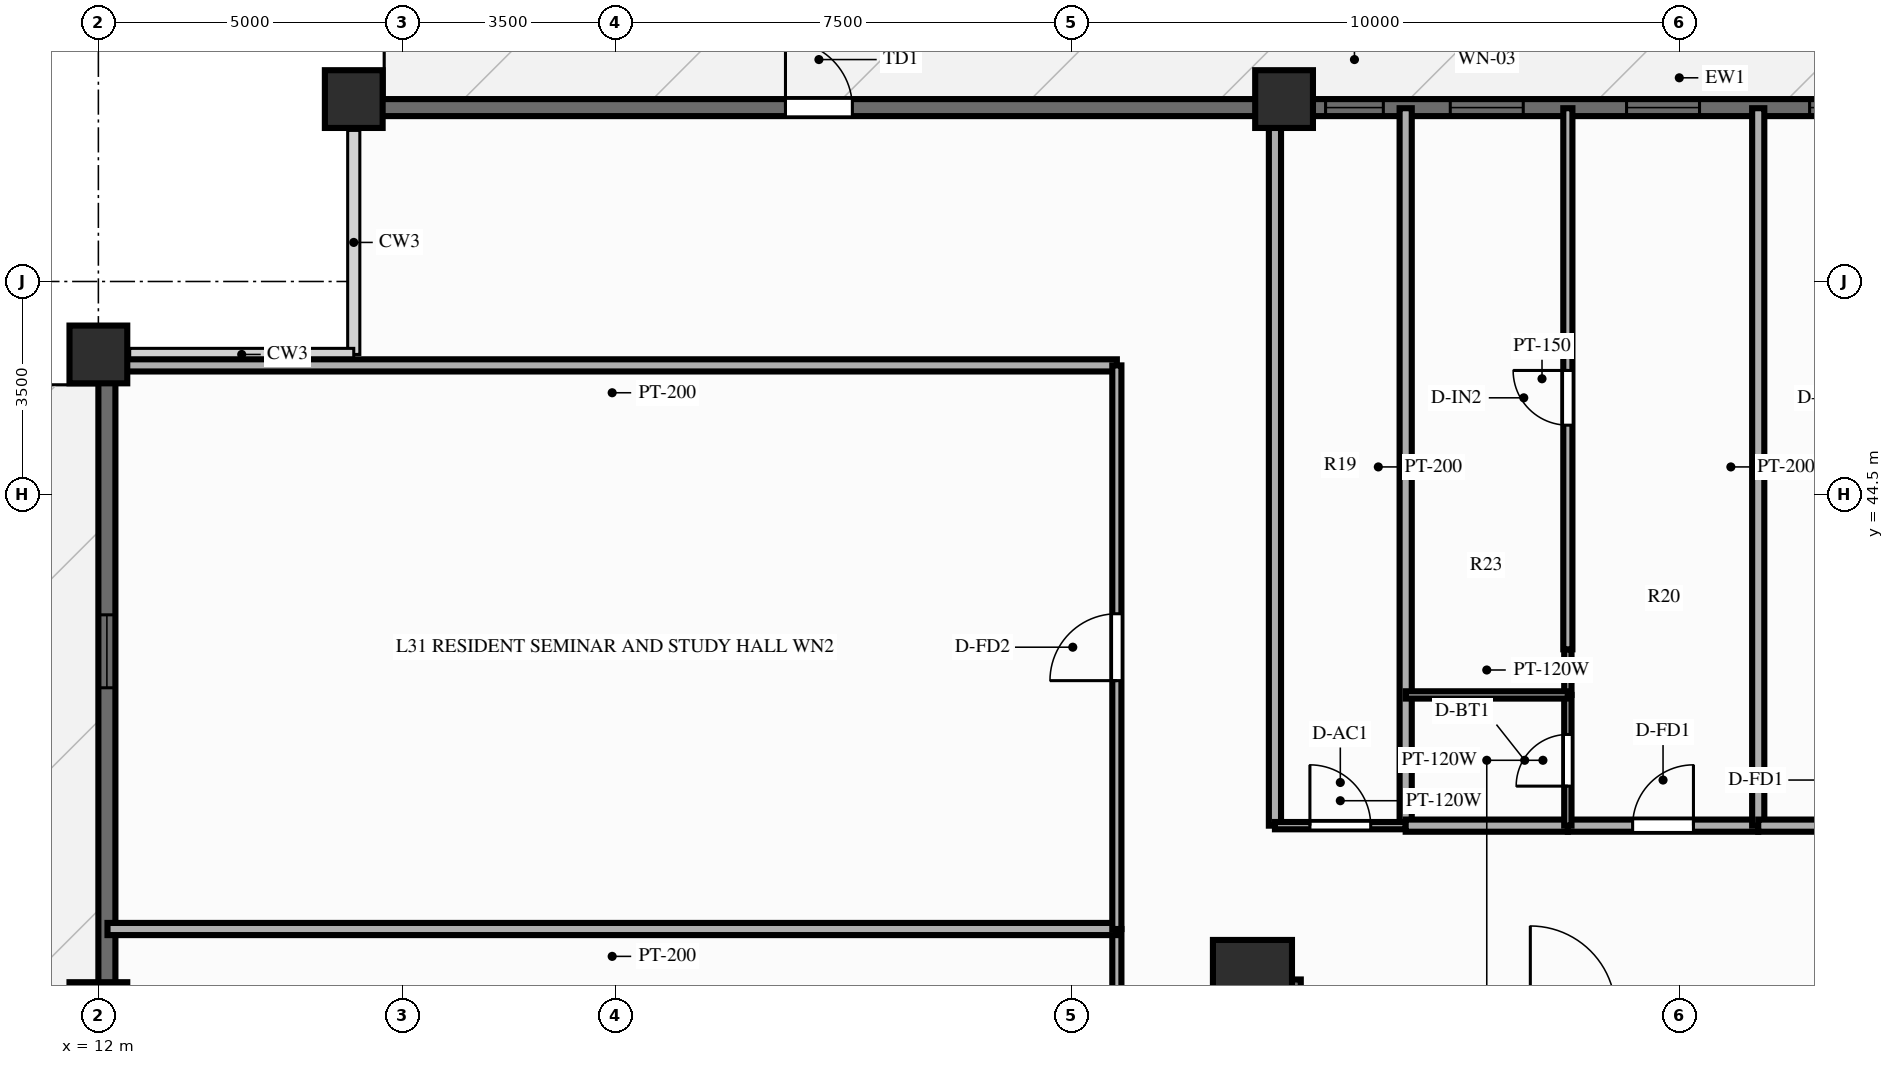
"""IFC4 building model, lengths in metres.
Left out: names, types, materials, properties, quantities, classifications, styles, units other than length and angle.
Written with IfcOpenShell. Run it as: python <this file> out.ifc"""

import sys

from ifc_helpers import new_model, si_unit, direction, frame, frame_2d, origin, origin_2d, place, context, subcontext, project, spatial, rectangle, extrude, source, transform, mapped, element, fill, save


model = new_model("IFC4")
c1 = context("Model", 3, precision=1e-05, world=origin(), true_north=direction((0.0, 1.0)))
c2 = subcontext(c1, "Body", "Model", "MODEL_VIEW")
j1 = project(units=[si_unit("LENGTHUNIT", "METRE"), si_unit("PLANEANGLEUNIT", "RADIAN")], contexts=[c1])
p1 = place(None, origin())
s1 = spatial("IfcSite", under=j1, at=p1, CompositionType="ELEMENT")
p2 = place(p1, origin())
s2 = spatial("IfcBuilding", under=s1, at=p2, CompositionType="ELEMENT")
p3 = place(p2, frame((0.0, 0.0, 98.85)))
s3 = spatial("IfcBuildingStorey", under=s2, at=p3, CompositionType="ELEMENT", Elevation=98.85)
p4 = place(p3, frame((31.5, 17.48, 0.0), z_axis=(0.0, 0.0, 1.0), x_axis=(0.0, 1.0, 0.0)))
e1 = element("IfcWall", 1, at=p4, inside=s3, PredefinedType="SHEAR", context=c2, shape_type="SweptSolid", body=[
    extrude(rectangle(XDim=19.04, YDim=0.55, at=frame_2d((9.52, 0.0))), origin(), (0.0, 0.0, 1.0), 3.0),
])
p5 = place(p4, frame((6.32, 0.0, 0.0)))
e2 = element("IfcOpeningElement", 2, at=p5, cuts=e1, PredefinedType="OPENING", context=c2, shape_type="SweptSolid", body=[
    extrude(rectangle(XDim=1.1, YDim=2.15, at=frame_2d((0.55, 1.075))), frame((0.0, 0.287, 0.0), z_axis=(0.0, -1.0, 0.0), x_axis=(1.0, 0.0, 0.0)), (0.0, 0.0, 1.0), 0.574),
])
m1 = source(origin(), c2, "Body", "SweptSolid", [
    extrude(rectangle(XDim=1.3, YDim=1.3, at=origin_2d()), origin(), (0.0, 0.0, 1.0), 3.0),
])
p6 = place(p3, frame((30.98, 36.52, 0.0), z_axis=(0.0, 0.0, 1.0), x_axis=(1.0, 0.0, 0.0)))
e3 = element("IfcColumn", 3, at=p6, inside=s3, PredefinedType="COLUMN", context=c2, shape_type="MappedRepresentation", body=[
    mapped(m1, transform((0.0, 0.0, 0.0), scale=1.0)),
])
m2 = source(origin(), c2, "Body", "SweptSolid", [
    extrude(rectangle(XDim=0.95, YDim=0.95, at=origin_2d()), origin(), (0.0, 0.0, 1.0), 3.0),
])
for number, where, z_axis, x_axis in (
    (4, (31.5, 51.0, 0.0), (0.0, 0.0, 1.0), (1.0, 0.0, 0.0)),
    (5, (16.2, 51.0, 0.0), (0.0, 0.0, 1.0), (1.0, 0.0, 0.0)),
    (6, (12.0, 46.8, 0.0), (0.0, 0.0, 1.0), (1.0, 0.0, 0.0)),
    (7, (12.0, 36.0, 0.0), (0.0, 0.0, 1.0), (1.0, 0.0, 0.0)),
):
    element("IfcColumn", number, at=place(p3, frame(where, z_axis=z_axis, x_axis=x_axis)), inside=s3, PredefinedType="COLUMN", context=c2, shape_type="MappedRepresentation", body=[
        mapped(m2, transform((0.0, 0.0, 0.0), scale=1.0)),
    ])
p7 = place(p3, frame((16.2, 50.86, 0.0), z_axis=(0.0, 0.0, 1.0), x_axis=(1.0, 0.0, 0.0)))
e8 = element("IfcWall", 8, at=p7, inside=s3, PredefinedType="SOLIDWALL", context=c2, shape_type="SweptSolid", body=[
    extrude(rectangle(XDim=43.6, YDim=0.28, at=frame_2d((21.8, 0.0))), origin(), (0.0, 0.0, 1.0), 2.28),
])
p8 = place(p7, frame((7.1, 0.0, 0.0)))
e9 = element("IfcOpeningElement", 9, at=p8, cuts=e8, PredefinedType="OPENING", context=c2, shape_type="SweptSolid", body=[
    extrude(rectangle(XDim=1.1, YDim=2.15, at=frame_2d((0.55, 1.075))), frame((0.0, 0.152, 0.0), z_axis=(0.0, -1.0, 0.0), x_axis=(1.0, 0.0, 0.0)), (0.0, 0.0, 1.0), 0.304),
])
p9 = place(p7, frame((15.982, 0.0, 0.25)))
e10 = element("IfcOpeningElement", 10, at=p9, cuts=e8, PredefinedType="OPENING", context=c2, shape_type="SweptSolid", body=[
    extrude(rectangle(XDim=0.95, YDim=1.5, at=frame_2d((0.475, 0.75))), frame((0.0, 0.152, 0.0), z_axis=(0.0, -1.0, 0.0), x_axis=(1.0, 0.0, 0.0)), (0.0, 0.0, 1.0), 0.304),
])
p10 = place(p7, frame((18.033, 0.0, 0.25)))
e11 = element("IfcOpeningElement", 11, at=p10, cuts=e8, PredefinedType="OPENING", context=c2, shape_type="SweptSolid", body=[
    extrude(rectangle(XDim=1.2, YDim=1.5, at=frame_2d((0.6, 0.75))), frame((0.0, 0.152, 0.0), z_axis=(0.0, -1.0, 0.0), x_axis=(1.0, 0.0, 0.0)), (0.0, 0.0, 1.0), 0.304),
])
p11 = place(p7, frame((20.933, 0.0, 0.25)))
e12 = element("IfcOpeningElement", 12, at=p11, cuts=e8, PredefinedType="OPENING", context=c2, shape_type="SweptSolid", body=[
    extrude(rectangle(XDim=1.2, YDim=1.5, at=frame_2d((0.6, 0.75))), frame((0.0, 0.152, 0.0), z_axis=(0.0, -1.0, 0.0), x_axis=(1.0, 0.0, 0.0)), (0.0, 0.0, 1.0), 0.304),
])
p12 = place(p7, frame((23.943, 0.0, 0.25)))
e13 = element("IfcOpeningElement", 13, at=p12, cuts=e8, PredefinedType="OPENING", context=c2, shape_type="SweptSolid", body=[
    extrude(rectangle(XDim=1.2, YDim=1.5, at=frame_2d((0.6, 0.75))), frame((0.0, 0.152, 0.0), z_axis=(0.0, -1.0, 0.0), x_axis=(1.0, 0.0, 0.0)), (0.0, 0.0, 1.0), 0.304),
])
p13 = place(p7, frame((26.386, 0.0, 0.25)))
e14 = element("IfcOpeningElement", 14, at=p13, cuts=e8, PredefinedType="OPENING", context=c2, shape_type="SweptSolid", body=[
    extrude(rectangle(XDim=1.2, YDim=1.5, at=frame_2d((0.6, 0.75))), frame((0.0, 0.152, 0.0), z_axis=(0.0, -1.0, 0.0), x_axis=(1.0, 0.0, 0.0)), (0.0, 0.0, 1.0), 0.304),
])
p14 = place(p7, frame((35.35, 0.0, 0.25)))
e15 = element("IfcOpeningElement", 15, at=p14, cuts=e8, PredefinedType="OPENING", context=c2, shape_type="SweptSolid", body=[
    extrude(rectangle(XDim=1.2, YDim=1.5, at=frame_2d((0.6, 0.75))), frame((0.0, 0.152, 0.0), z_axis=(0.0, -1.0, 0.0), x_axis=(1.0, 0.0, 0.0)), (0.0, 0.0, 1.0), 0.304),
])
p15 = place(p3, frame((12.14, 7.2, 0.0), z_axis=(0.0, 0.0, 1.0), x_axis=(0.0, 1.0, 0.0)))
e16 = element("IfcWall", 16, at=p15, inside=s3, PredefinedType="SOLIDWALL", context=c2, shape_type="SweptSolid", body=[
    extrude(rectangle(XDim=39.6, YDim=0.28, at=frame_2d((19.8, 0.0))), origin(), (0.0, 0.0, 1.0), 2.28),
])
p16 = place(p15, frame((4.083, 0.0, 0.0)))
e17 = element("IfcOpeningElement", 17, at=p16, cuts=e16, PredefinedType="OPENING", context=c2, shape_type="SweptSolid", body=[
    extrude(rectangle(XDim=1.6, YDim=2.15, at=frame_2d((0.8, 1.075))), frame((0.0, 0.152, 0.0), z_axis=(0.0, -1.0, 0.0), x_axis=(1.0, 0.0, 0.0)), (0.0, 0.0, 1.0), 0.304),
])
p17 = place(p15, frame((14.317, 0.0, 0.25)))
e18 = element("IfcOpeningElement", 18, at=p17, cuts=e16, PredefinedType="OPENING", context=c2, shape_type="SweptSolid", body=[
    extrude(rectangle(XDim=1.2, YDim=1.5, at=frame_2d((0.6, 0.75))), frame((0.0, 0.152, 0.0), z_axis=(0.0, -1.0, 0.0), x_axis=(1.0, 0.0, 0.0)), (0.0, 0.0, 1.0), 0.304),
])
p18 = place(p15, frame((19.2, 0.0, 0.25)))
e19 = element("IfcOpeningElement", 19, at=p18, cuts=e16, PredefinedType="OPENING", context=c2, shape_type="SweptSolid", body=[
    extrude(rectangle(XDim=1.2, YDim=1.5, at=frame_2d((0.6, 0.75))), frame((0.0, 0.152, 0.0), z_axis=(0.0, -1.0, 0.0), x_axis=(1.0, 0.0, 0.0)), (0.0, 0.0, 1.0), 0.304),
])
p19 = place(p15, frame((24.083, 0.0, 0.25)))
e20 = element("IfcOpeningElement", 20, at=p19, cuts=e16, PredefinedType="OPENING", context=c2, shape_type="SweptSolid", body=[
    extrude(rectangle(XDim=1.2, YDim=1.5, at=frame_2d((0.6, 0.75))), frame((0.0, 0.152, 0.0), z_axis=(0.0, -1.0, 0.0), x_axis=(1.0, 0.0, 0.0)), (0.0, 0.0, 1.0), 0.304),
])
p20 = place(p15, frame((34.117, 0.0, 0.25)))
e21 = element("IfcOpeningElement", 21, at=p20, cuts=e16, PredefinedType="OPENING", context=c2, shape_type="SweptSolid", body=[
    extrude(rectangle(XDim=1.2, YDim=1.5, at=frame_2d((0.6, 0.75))), frame((0.0, 0.152, 0.0), z_axis=(0.0, -1.0, 0.0), x_axis=(1.0, 0.0, 0.0)), (0.0, 0.0, 1.0), 0.304),
])
p21 = place(p3, frame((31.35, 39.05, 0.0), z_axis=(0.0, 0.0, 1.0), x_axis=(0.0, 1.0, 0.0)))
e22 = element("IfcWall", 22, at=p21, inside=s3, PredefinedType="PARTITIONING", context=c2, shape_type="SweptSolid", body=[
    extrude(rectangle(XDim=11.8, YDim=0.2, at=frame_2d((5.9, 0.0))), origin(), (0.0, 0.0, 1.0), 2.34),
])
p22 = place(p3, frame((33.5, 39.05, 0.0), z_axis=(0.0, 0.0, 1.0), x_axis=(0.0, 1.0, 0.0)))
e23 = element("IfcWall", 23, at=p22, inside=s3, PredefinedType="PARTITIONING", context=c2, shape_type="SweptSolid", body=[
    extrude(rectangle(XDim=11.8, YDim=0.2, at=frame_2d((5.9, 0.0))), origin(), (0.0, 0.0, 1.0), 2.79),
])
p23 = place(p3, frame((31.35, 39.05, 0.0), z_axis=(0.0, 0.0, 1.0), x_axis=(1.0, 0.0, 0.0)))
e24 = element("IfcWall", 24, at=p23, inside=s3, PredefinedType="PARTITIONING", context=c2, shape_type="SweptSolid", body=[
    extrude(rectangle(XDim=2.15, YDim=0.12, at=frame_2d((1.075, 0.0))), origin(), (0.0, 0.0, 1.0), 2.79),
])
p24 = place(p23, frame((0.575, 0.0, 0.0)))
e25 = element("IfcOpeningElement", 25, at=p24, cuts=e24, PredefinedType="OPENING", context=c2, shape_type="SweptSolid", body=[
    extrude(rectangle(XDim=1.0, YDim=2.1, at=frame_2d((0.5, 1.05))), frame((0.0, 0.072, 0.0), z_axis=(0.0, -1.0, 0.0), x_axis=(1.0, 0.0, 0.0)), (0.0, 0.0, 1.0), 0.144),
])
p25 = place(p3, frame((33.5, 39.05, 0.0), z_axis=(0.0, 0.0, 1.0), x_axis=(1.0, 0.0, 0.0)))
e26 = element("IfcWall", 26, at=p25, inside=s3, PredefinedType="PARTITIONING", context=c2, shape_type="SweptSolid", body=[
    extrude(rectangle(XDim=2.667, YDim=0.2, at=frame_2d((1.333, 0.0))), origin(), (0.0, 0.0, 1.0), 2.79),
])
p26 = place(p3, frame((36.167, 39.05, 0.0), z_axis=(0.0, 0.0, 1.0), x_axis=(1.0, 0.0, 0.0)))
e27 = element("IfcWall", 27, at=p26, inside=s3, PredefinedType="PARTITIONING", context=c2, shape_type="SweptSolid", body=[
    extrude(rectangle(XDim=3.131, YDim=0.2, at=frame_2d((1.565, 0.0))), origin(), (0.0, 0.0, 1.0), 2.79),
])
p27 = place(p26, frame((1.065, 0.0, 0.0)))
e28 = element("IfcOpeningElement", 28, at=p27, cuts=e27, PredefinedType="OPENING", context=c2, shape_type="SweptSolid", body=[
    extrude(rectangle(XDim=1.0, YDim=2.15, at=frame_2d((0.5, 1.075))), frame((0.0, 0.112, 0.0), z_axis=(0.0, -1.0, 0.0), x_axis=(1.0, 0.0, 0.0)), (0.0, 0.0, 1.0), 0.224),
])
p28 = place(p3, frame((36.167, 39.05, 0.0), z_axis=(0.0, 0.0, 1.0), x_axis=(0.0, 1.0, 0.0)))
e29 = element("IfcWall", 29, at=p28, inside=s3, PredefinedType="PARTITIONING", context=c2, shape_type="SweptSolid", body=[
    extrude(rectangle(XDim=2.15, YDim=0.12, at=frame_2d((1.075, 0.0))), origin(), (0.0, 0.0, 1.0), 2.79),
])
p29 = place(p28, frame((0.65, 0.0, 0.0)))
e30 = element("IfcOpeningElement", 30, at=p29, cuts=e29, PredefinedType="OPENING", context=c2, shape_type="SweptSolid", body=[
    extrude(rectangle(XDim=0.85, YDim=2.05, at=frame_2d((0.425, 1.025))), frame((0.0, 0.072, 0.0), z_axis=(0.0, -1.0, 0.0), x_axis=(1.0, 0.0, 0.0)), (0.0, 0.0, 1.0), 0.144),
])
p30 = place(p3, frame((36.167, 41.2, 0.0), z_axis=(0.0, 0.0, 1.0), x_axis=(0.0, 1.0, 0.0)))
e31 = element("IfcWall", 31, at=p30, inside=s3, PredefinedType="PARTITIONING", context=c2, shape_type="SweptSolid", body=[
    extrude(rectangle(XDim=0.75, YDim=0.12, at=frame_2d((0.375, 0.0))), origin(), (0.0, 0.0, 1.0), 2.79),
])
p31 = place(p3, frame((33.5, 41.2, 0.0), z_axis=(0.0, 0.0, 1.0), x_axis=(1.0, 0.0, 0.0)))
e32 = element("IfcWall", 32, at=p31, inside=s3, PredefinedType="PARTITIONING", context=c2, shape_type="SweptSolid", body=[
    extrude(rectangle(XDim=2.667, YDim=0.12, at=frame_2d((1.333, 0.0))), origin(), (0.0, 0.0, 1.0), 2.79),
])
p32 = place(p3, frame((36.167, 41.95, 0.0), z_axis=(0.0, 0.0, 1.0), x_axis=(0.0, 1.0, 0.0)))
e33 = element("IfcWall", 33, at=p32, inside=s3, PredefinedType="PARTITIONING", context=c2, shape_type="SweptSolid", body=[
    extrude(rectangle(XDim=8.9, YDim=0.15, at=frame_2d((4.45, 0.0))), origin(), (0.0, 0.0, 1.0), 2.79),
])
p33 = place(p32, frame((3.687, 0.0, 0.0)))
e34 = element("IfcOpeningElement", 34, at=p33, cuts=e33, PredefinedType="OPENING", context=c2, shape_type="SweptSolid", body=[
    extrude(rectangle(XDim=0.9, YDim=2.1, at=frame_2d((0.45, 1.05))), frame((0.0, 0.087, 0.0), z_axis=(0.0, -1.0, 0.0), x_axis=(1.0, 0.0, 0.0)), (0.0, 0.0, 1.0), 0.174),
])
p34 = place(p3, frame((39.298, 39.05, 0.0), z_axis=(0.0, 0.0, 1.0), x_axis=(0.0, 1.0, 0.0)))
e35 = element("IfcWall", 35, at=p34, inside=s3, PredefinedType="PARTITIONING", context=c2, shape_type="SweptSolid", body=[
    extrude(rectangle(XDim=11.8, YDim=0.2, at=frame_2d((5.9, 0.0))), origin(), (0.0, 0.0, 1.0), 2.79),
])
p35 = place(p3, frame((39.298, 39.05, 0.0), z_axis=(0.0, 0.0, 1.0), x_axis=(1.0, 0.0, 0.0)))
e36 = element("IfcWall", 36, at=p35, inside=s3, PredefinedType="PARTITIONING", context=c2, shape_type="SweptSolid", body=[
    extrude(rectangle(XDim=2.89, YDim=0.2, at=frame_2d((1.445, 0.0))), origin(), (0.0, 0.0, 1.0), 2.79),
])
p36 = place(p35, frame((0.945, 0.0, 0.0)))
e37 = element("IfcOpeningElement", 37, at=p36, cuts=e36, PredefinedType="OPENING", context=c2, shape_type="SweptSolid", body=[
    extrude(rectangle(XDim=1.0, YDim=2.15, at=frame_2d((0.5, 1.075))), frame((0.0, 0.112, 0.0), z_axis=(0.0, -1.0, 0.0), x_axis=(1.0, 0.0, 0.0)), (0.0, 0.0, 1.0), 0.224),
])
p37 = place(p3, frame((28.75, 46.62, 0.0), z_axis=(0.0, 0.0, 1.0), x_axis=(-1.0, 0.0, 0.0)))
e38 = element("IfcWall", 38, at=p37, inside=s3, PredefinedType="PARTITIONING", context=c2, shape_type="SweptSolid", body=[
    extrude(rectangle(XDim=16.6, YDim=0.2, at=frame_2d((8.3, 0.0))), origin(), (0.0, 0.0, 1.0), 2.79),
])
p38 = place(p3, frame((28.75, 28.08, 0.0), z_axis=(0.0, 0.0, 1.0), x_axis=(0.0, 1.0, 0.0)))
e39 = element("IfcWall", 39, at=p38, inside=s3, PredefinedType="PARTITIONING", context=c2, shape_type="SweptSolid", body=[
    extrude(rectangle(XDim=9.27, YDim=0.15, at=frame_2d((4.635, 0.0))), origin(), (0.0, 0.0, 1.0), 2.79),
])
p39 = place(p38, frame((4.085, 0.0, 0.0)))
e40 = element("IfcOpeningElement", 40, at=p39, cuts=e39, PredefinedType="OPENING", context=c2, shape_type="SweptSolid", body=[
    extrude(rectangle(XDim=1.1, YDim=2.15, at=frame_2d((0.55, 1.075))), frame((0.0, 0.087, 0.0), z_axis=(0.0, -1.0, 0.0), x_axis=(1.0, 0.0, 0.0)), (0.0, 0.0, 1.0), 0.174),
])
p40 = place(p3, frame((28.75, 37.35, 0.0), z_axis=(0.0, 0.0, 1.0), x_axis=(-1.0, 0.0, 0.0)))
e41 = element("IfcWall", 41, at=p40, inside=s3, PredefinedType="PARTITIONING", context=c2, shape_type="SweptSolid", body=[
    extrude(rectangle(XDim=16.6, YDim=0.2, at=frame_2d((8.3, 0.0))), origin(), (0.0, 0.0, 1.0), 2.79),
])
p41 = place(p3, frame((28.75, 37.35, 0.0), z_axis=(0.0, 0.0, 1.0), x_axis=(0.0, 1.0, 0.0)))
e42 = element("IfcWall", 42, at=p41, inside=s3, PredefinedType="PARTITIONING", context=c2, shape_type="SweptSolid", body=[
    extrude(rectangle(XDim=9.27, YDim=0.15, at=frame_2d((4.635, 0.0))), origin(), (0.0, 0.0, 1.0), 2.79),
])
p42 = place(p41, frame((4.085, 0.0, 0.0)))
e43 = element("IfcOpeningElement", 43, at=p42, cuts=e42, PredefinedType="OPENING", context=c2, shape_type="SweptSolid", body=[
    extrude(rectangle(XDim=1.1, YDim=2.15, at=frame_2d((0.55, 1.075))), frame((0.0, 0.087, 0.0), z_axis=(0.0, -1.0, 0.0), x_axis=(1.0, 0.0, 0.0)), (0.0, 0.0, 1.0), 0.174),
])
m3 = source(origin(), c2, "Body", "SweptSolid", [
    extrude(rectangle(XDim=1.1, YDim=2.15, at=frame_2d((0.55, 1.075))), frame((0.0, 0.025, 0.0), z_axis=(0.0, -1.0, 0.0), x_axis=(1.0, 0.0, 0.0)), (0.0, 0.0, 1.0), 0.05),
])
p43 = place(p8, origin())
e44 = element("IfcDoor", 44, at=p43, inside=s3, OperationType="SINGLE_SWING_LEFT", PredefinedType="DOOR", context=c2, shape_type="MappedRepresentation", body=[
    mapped(m3, transform((0.0, 0.0, 0.0), scale=1.0)),
])
fill(e9, e44)
m4 = source(origin(), c2, "Body", "SweptSolid", [
    extrude(rectangle(XDim=0.95, YDim=1.5, at=frame_2d((0.475, 0.75))), frame((0.0, 0.03, 0.0), z_axis=(0.0, -1.0, 0.0), x_axis=(1.0, 0.0, 0.0)), (0.0, 0.0, 1.0), 0.06),
])
p44 = place(p9, origin())
e45 = element("IfcWindow", 45, at=p44, inside=s3, PartitioningType="SINGLE_PANEL", PredefinedType="WINDOW", context=c2, shape_type="MappedRepresentation", body=[
    mapped(m4, transform((0.0, 0.0, 0.0), scale=1.0)),
])
fill(e10, e45)
m5 = source(origin(), c2, "Body", "SweptSolid", [
    extrude(rectangle(XDim=1.2, YDim=1.5, at=frame_2d((0.6, 0.75))), frame((0.0, 0.03, 0.0), z_axis=(0.0, -1.0, 0.0), x_axis=(1.0, 0.0, 0.0)), (0.0, 0.0, 1.0), 0.06),
])
p45 = place(p10, origin())
e46 = element("IfcWindow", 46, at=p45, inside=s3, PartitioningType="SINGLE_PANEL", PredefinedType="WINDOW", context=c2, shape_type="MappedRepresentation", body=[
    mapped(m5, transform((0.0, 0.0, 0.0), scale=1.0)),
])
fill(e11, e46)
p46 = place(p11, origin())
e47 = element("IfcWindow", 47, at=p46, inside=s3, PartitioningType="SINGLE_PANEL", PredefinedType="WINDOW", context=c2, shape_type="MappedRepresentation", body=[
    mapped(m5, transform((0.0, 0.0, 0.0), scale=1.0)),
])
fill(e12, e47)
p47 = place(p12, origin())
e48 = element("IfcWindow", 48, at=p47, inside=s3, PartitioningType="SINGLE_PANEL", PredefinedType="WINDOW", context=c2, shape_type="MappedRepresentation", body=[
    mapped(m5, transform((0.0, 0.0, 0.0), scale=1.0)),
])
fill(e13, e48)
p48 = place(p20, origin())
e49 = element("IfcWindow", 49, at=p48, inside=s3, PartitioningType="SINGLE_PANEL", PredefinedType="WINDOW", context=c2, shape_type="MappedRepresentation", body=[
    mapped(m5, transform((0.0, 0.0, 0.0), scale=1.0)),
])
fill(e21, e49)
m6 = source(origin(), c2, "Body", "SweptSolid", [
    extrude(rectangle(XDim=1.0, YDim=2.1, at=frame_2d((0.5, 1.05))), frame((0.0, 0.025, 0.0), z_axis=(0.0, -1.0, 0.0), x_axis=(1.0, 0.0, 0.0)), (0.0, 0.0, 1.0), 0.05),
])
p49 = place(p24, origin())
e50 = element("IfcDoor", 50, at=p49, inside=s3, OperationType="SINGLE_SWING_LEFT", PredefinedType="DOOR", context=c2, shape_type="MappedRepresentation", body=[
    mapped(m6, transform((0.0, 0.0, 0.0), scale=1.0)),
])
fill(e25, e50)
m7 = source(origin(), c2, "Body", "SweptSolid", [
    extrude(rectangle(XDim=1.0, YDim=2.15, at=frame_2d((0.5, 1.075))), frame((0.0, 0.025, 0.0), z_axis=(0.0, -1.0, 0.0), x_axis=(1.0, 0.0, 0.0)), (0.0, 0.0, 1.0), 0.05),
])
p50 = place(p27, origin())
e51 = element("IfcDoor", 51, at=p50, inside=s3, OperationType="SINGLE_SWING_RIGHT", PredefinedType="DOOR", context=c2, shape_type="MappedRepresentation", body=[
    mapped(m7, transform((0.0, 0.0, 0.0), scale=1.0)),
])
fill(e28, e51)
m8 = source(origin(), c2, "Body", "SweptSolid", [
    extrude(rectangle(XDim=0.85, YDim=2.05, at=frame_2d((0.425, 1.025))), frame((0.0, 0.025, 0.0), z_axis=(0.0, -1.0, 0.0), x_axis=(1.0, 0.0, 0.0)), (0.0, 0.0, 1.0), 0.05),
])
p51 = place(p29, origin())
e52 = element("IfcDoor", 52, at=p51, inside=s3, OperationType="SINGLE_SWING_LEFT", PredefinedType="DOOR", context=c2, shape_type="MappedRepresentation", body=[
    mapped(m8, transform((0.0, 0.0, 0.0), scale=1.0)),
])
fill(e30, e52)
m9 = source(origin(), c2, "Body", "SweptSolid", [
    extrude(rectangle(XDim=0.9, YDim=2.1, at=frame_2d((0.45, 1.05))), frame((0.0, 0.025, 0.0), z_axis=(0.0, -1.0, 0.0), x_axis=(1.0, 0.0, 0.0)), (0.0, 0.0, 1.0), 0.05),
])
p52 = place(p33, origin())
e53 = element("IfcDoor", 53, at=p52, inside=s3, OperationType="SINGLE_SWING_RIGHT", PredefinedType="DOOR", context=c2, shape_type="MappedRepresentation", body=[
    mapped(m9, transform((0.0, 0.0, 0.0), scale=1.0)),
])
fill(e34, e53)
p53 = place(p42, origin())
e54 = element("IfcDoor", 54, at=p53, inside=s3, OperationType="SINGLE_SWING_LEFT", PredefinedType="DOOR", context=c2, shape_type="MappedRepresentation", body=[
    mapped(m3, transform((0.0, 0.0, 0.0), scale=1.0)),
])
fill(e43, e54)
save(model, sys.argv[1])
